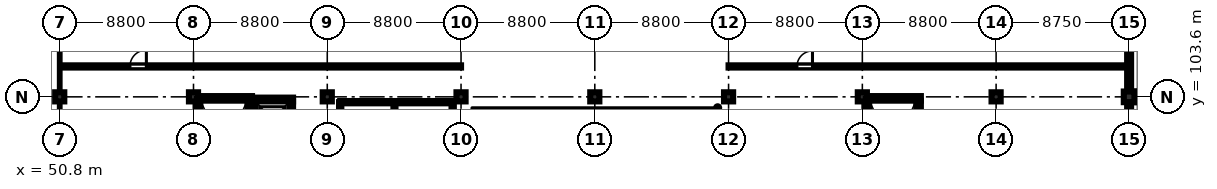
"""IFC4 building model, lengths in metres.
Left out: names, types, materials, properties, quantities, classifications, styles, units other than length and angle.
Written with IfcOpenShell. Run it as: python <this file> out.ifc"""

import sys

from ifc_helpers import new_model, si_unit, direction, frame, frame_2d, origin, origin_2d, place, context, subcontext, project, spatial, rectangle, extrude, element, fill, save


model = new_model("IFC4")
c1 = context("Model", 3, precision=1e-05, world=origin(), true_north=direction((0.0, 1.0)))
c2 = subcontext(c1, "Body", "Model", "MODEL_VIEW")
j1 = project(units=[si_unit("LENGTHUNIT", "METRE"), si_unit("PLANEANGLEUNIT", "RADIAN")], contexts=[c1])
p1 = place(None, origin())
s1 = spatial("IfcSite", under=j1, at=p1, CompositionType="ELEMENT")
p2 = place(p1, origin())
s2 = spatial("IfcBuilding", under=s1, at=p2, CompositionType="ELEMENT")
p3 = place(p2, frame((0.0, 0.0, 10.2)))
s3 = spatial("IfcBuildingStorey", under=s2, at=p3, CompositionType="ELEMENT", Elevation=10.2)
for number, where, z_axis, x_axis in (
    (1, (50.8, 103.6, 0.0), (0.0, 0.0, 1.0), (1.0, 0.0, 0.0)),
    (2, (59.6, 103.6, 0.0), (0.0, 0.0, 1.0), (1.0, 0.0, 0.0)),
    (3, (68.4, 103.6, 0.0), (0.0, 0.0, 1.0), (1.0, 0.0, 0.0)),
    (4, (77.2, 103.6, 0.0), (0.0, 0.0, 1.0), (1.0, 0.0, 0.0)),
    (5, (86.0, 103.6, 0.0), (0.0, 0.0, 1.0), (1.0, 0.0, 0.0)),
    (6, (94.8, 103.6, 0.0), (0.0, 0.0, 1.0), (1.0, 0.0, 0.0)),
    (7, (103.6, 103.6, 0.0), (0.0, 0.0, 1.0), (1.0, 0.0, 0.0)),
    (8, (112.4, 103.6, 0.0), (0.0, 0.0, 1.0), (1.0, 0.0, 0.0)),
):
    element("IfcColumn", number, at=place(p3, frame(where, z_axis=z_axis, x_axis=x_axis)), inside=s3, PredefinedType="COLUMN", context=c2, shape_type="SweptSolid", body=[
        extrude(rectangle(XDim=0.6, YDim=0.6, at=origin_2d()), origin(), (0.0, 0.0, 1.0), 4.26),
    ])
for number, where, z_axis, x_axis in (
    (9, (121.15, 103.6, 0.0), (0.0, 0.0, 1.0), (1.0, 0.0, 0.0)),
    (10, (122.0, 103.6, 0.0), (0.0, 0.0, 1.0), (1.0, 0.0, 0.0)),
):
    element("IfcColumn", number, at=place(p3, frame(where, z_axis=z_axis, x_axis=x_axis)), inside=s3, PredefinedType="COLUMN", context=c2, shape_type="SweptSolid", body=[
        extrude(rectangle(XDim=0.7, YDim=0.7, at=origin_2d()), origin(), (0.0, 0.0, 1.0), 4.26),
    ])
p4 = place(p3, frame((59.75, 103.5, 0.0), z_axis=(0.0, 0.0, 1.0), x_axis=(1.0, 0.0, 0.0)))
e11 = element("IfcWall", 11, at=p4, inside=s3, PredefinedType="SHEAR", context=c2, shape_type="SweptSolid", body=[
    extrude(rectangle(XDim=3.7, YDim=0.3, at=frame_2d((1.85, 0.0))), origin(), (0.0, 0.0, 1.0), 4.26),
])
for number, where, z_axis, x_axis in (
    (12, (59.9, 95.45, 0.0), (0.0, 0.0, 1.0), (0.0, 1.0, 0.0)),
    (13, (63.3, 95.45, 0.0), (0.0, 0.0, 1.0), (0.0, 1.0, 0.0)),
):
    element("IfcWall", number, at=place(p3, frame(where, z_axis=z_axis, x_axis=x_axis)), inside=s3, PredefinedType="SHEAR", context=c2, shape_type="SweptSolid", body=[
        extrude(rectangle(XDim=7.9, YDim=0.3, at=frame_2d((3.95, 0.0))), origin(), (0.0, 0.0, 1.0), 4.26),
    ])
p5 = place(p3, frame((103.75, 103.5, 0.0), z_axis=(0.0, 0.0, 1.0), x_axis=(1.0, 0.0, 0.0)))
e14 = element("IfcWall", 14, at=p5, inside=s3, PredefinedType="SHEAR", context=c2, shape_type="SweptSolid", body=[
    extrude(rectangle(XDim=3.7, YDim=0.3, at=frame_2d((1.85, 0.0))), origin(), (0.0, 0.0, 1.0), 4.26),
])
for number, where, z_axis, x_axis in (
    (15, (103.9, 95.45, 0.0), (0.0, 0.0, 1.0), (0.0, 1.0, 0.0)),
    (16, (107.3, 95.45, 0.0), (0.0, 0.0, 1.0), (0.0, 1.0, 0.0)),
):
    element("IfcWall", number, at=place(p3, frame(where, z_axis=z_axis, x_axis=x_axis)), inside=s3, PredefinedType="SHEAR", context=c2, shape_type="SweptSolid", body=[
        extrude(rectangle(XDim=7.9, YDim=0.3, at=frame_2d((3.95, 0.0))), origin(), (0.0, 0.0, 1.0), 4.26),
    ])
p6 = place(p3, frame((63.45, 103.425, 0.0), z_axis=(0.0, 0.0, 1.0), x_axis=(1.0, 0.0, 0.0)))
e17 = element("IfcWall", 17, at=p6, inside=s3, PredefinedType="SHEAR", context=c2, shape_type="SweptSolid", body=[
    extrude(rectangle(XDim=2.7, YDim=0.25, at=frame_2d((1.35, 0.0))), origin(), (0.0, 0.0, 1.0), 4.26),
])
for number, where, z_axis, x_axis in (
    (18, (63.575, 100.8, 0.0), (0.0, 0.0, 1.0), (0.0, 1.0, 0.0)),
    (19, (66.025, 100.8, 0.0), (0.0, 0.0, 1.0), (0.0, 1.0, 0.0)),
):
    element("IfcWall", number, at=place(p3, frame(where, z_axis=z_axis, x_axis=x_axis)), inside=s3, PredefinedType="SHEAR", context=c2, shape_type="SweptSolid", body=[
        extrude(rectangle(XDim=2.5, YDim=0.25, at=frame_2d((1.25, 0.0))), origin(), (0.0, 0.0, 1.0), 4.26),
    ])
p7 = place(p3, frame((121.15, 103.25, 0.0), z_axis=(0.0, 0.0, 1.0), x_axis=(0.0, -1.0, 0.0)))
e20 = element("IfcWall", 20, at=p7, inside=s3, PredefinedType="STANDARD", context=c2, shape_type="SweptSolid", body=[
    extrude(rectangle(XDim=7.7, YDim=0.26, at=frame_2d((3.85, 0.0))), origin(), (0.0, 0.0, 1.0), 3.61),
])
p8 = place(p3, frame((121.15, 111.1, 0.0), z_axis=(0.0, 0.0, 1.0), x_axis=(0.0, -1.0, 0.0)))
e21 = element("IfcWall", 21, at=p8, inside=s3, PredefinedType="STANDARD", context=c2, shape_type="SweptSolid", body=[
    extrude(rectangle(XDim=7.15, YDim=0.26, at=frame_2d((3.575, 0.0))), origin(), (0.0, 0.0, 1.0), 3.61),
])
p9 = place(p3, frame((69.25, 94.68, 0.0), z_axis=(0.0, 0.0, 1.0), x_axis=(0.0, 1.0, 0.0)))
e22 = element("IfcWall", 22, at=p9, inside=s3, PredefinedType="PARTITIONING", context=c2, shape_type="SweptSolid", body=[
    extrude(rectangle(XDim=8.57, YDim=0.15, at=frame_2d((4.285, 0.0))), origin(), (0.0, 0.0, 1.0), 4.26),
])
p10 = place(p3, frame((72.82, 94.68, 0.0), z_axis=(0.0, 0.0, 1.0), x_axis=(0.0, 1.0, 0.0)))
e23 = element("IfcWall", 23, at=p10, inside=s3, PredefinedType="PARTITIONING", context=c2, shape_type="SweptSolid", body=[
    extrude(rectangle(XDim=8.57, YDim=0.135, at=frame_2d((4.285, 0.0))), origin(), (0.0, 0.0, 1.0), 3.76),
])
p11 = place(p3, frame((69.25, 103.25, 0.0), z_axis=(0.0, 0.0, 1.0), x_axis=(1.0, 0.0, 0.0)))
e24 = element("IfcWall", 24, at=p11, inside=s3, PredefinedType="PARTITIONING", context=c2, shape_type="SweptSolid", body=[
    extrude(rectangle(XDim=7.4, YDim=0.15, at=frame_2d((3.7, 0.0))), origin(), (0.0, 0.0, 1.0), 4.26),
])
p12 = place(p3, frame((76.65, 94.68, 0.0), z_axis=(0.0, 0.0, 1.0), x_axis=(0.0, 1.0, 0.0)))
e25 = element("IfcWall", 25, at=p12, inside=s3, PredefinedType="PARTITIONING", context=c2, shape_type="SweptSolid", body=[
    extrude(rectangle(XDim=8.57, YDim=0.15, at=frame_2d((4.285, 0.0))), origin(), (0.0, 0.0, 1.0), 4.26),
])
p13 = place(p3, frame((50.92, 105.6, 0.0), z_axis=(0.0, 0.0, 1.0), x_axis=(1.0, 0.0, 0.0)))
e26 = element("IfcWall", 26, at=p13, inside=s3, PredefinedType="PARTITIONING", context=c2, shape_type="SweptSolid", body=[
    extrude(rectangle(XDim=26.28, YDim=0.145, at=frame_2d((13.14, 0.0))), origin(), (0.0, 0.0, 1.0), 4.26),
])
p14 = place(p13, frame((4.5, 0.0, 0.0)))
e27 = element("IfcOpeningElement", 27, at=p14, cuts=e26, PredefinedType="OPENING", context=c2, shape_type="SweptSolid", body=[
    extrude(rectangle(XDim=1.08, YDim=2.15, at=frame_2d((0.54, 1.075))), frame((0.0, 0.083, 0.0), z_axis=(0.0, -1.0, 0.0), x_axis=(1.0, 0.0, 0.0)), (0.0, 0.0, 1.0), 0.165),
])
p15 = place(p3, frame((94.8, 105.6, 0.0), z_axis=(0.0, 0.0, 1.0), x_axis=(1.0, 0.0, 0.0)))
e28 = element("IfcWall", 28, at=p15, inside=s3, PredefinedType="PARTITIONING", context=c2, shape_type="SweptSolid", body=[
    extrude(rectangle(XDim=26.22, YDim=0.145, at=frame_2d((13.11, 0.0))), origin(), (0.0, 0.0, 1.0), 4.26),
])
p16 = place(p15, frame((4.5, 0.0, 0.0)))
e29 = element("IfcOpeningElement", 29, at=p16, cuts=e28, PredefinedType="OPENING", context=c2, shape_type="SweptSolid", body=[
    extrude(rectangle(XDim=1.02, YDim=2.15, at=frame_2d((0.51, 1.075))), frame((0.0, 0.083, 0.0), z_axis=(0.0, -1.0, 0.0), x_axis=(1.0, 0.0, 0.0)), (0.0, 0.0, 1.0), 0.165),
])
p17 = place(p14, origin())
e30 = element("IfcDoor", 30, at=p17, inside=s3, OperationType="SINGLE_SWING_RIGHT", PredefinedType="DOOR", context=c2, shape_type="SweptSolid", body=[
    extrude(rectangle(XDim=1.08, YDim=2.15, at=frame_2d((0.54, 1.075))), frame((0.0, 0.025, 0.0), z_axis=(0.0, -1.0, 0.0), x_axis=(1.0, 0.0, 0.0)), (0.0, 0.0, 1.0), 0.05),
])
fill(e27, e30)
p18 = place(p16, origin())
e31 = element("IfcDoor", 31, at=p18, inside=s3, OperationType="SINGLE_SWING_RIGHT", PredefinedType="DOOR", context=c2, shape_type="SweptSolid", body=[
    extrude(rectangle(XDim=1.02, YDim=2.15, at=frame_2d((0.51, 1.075))), frame((0.0, 0.025, 0.0), z_axis=(0.0, -1.0, 0.0), x_axis=(1.0, 0.0, 0.0)), (0.0, 0.0, 1.0), 0.05),
])
fill(e29, e31)
save(model, sys.argv[1])
